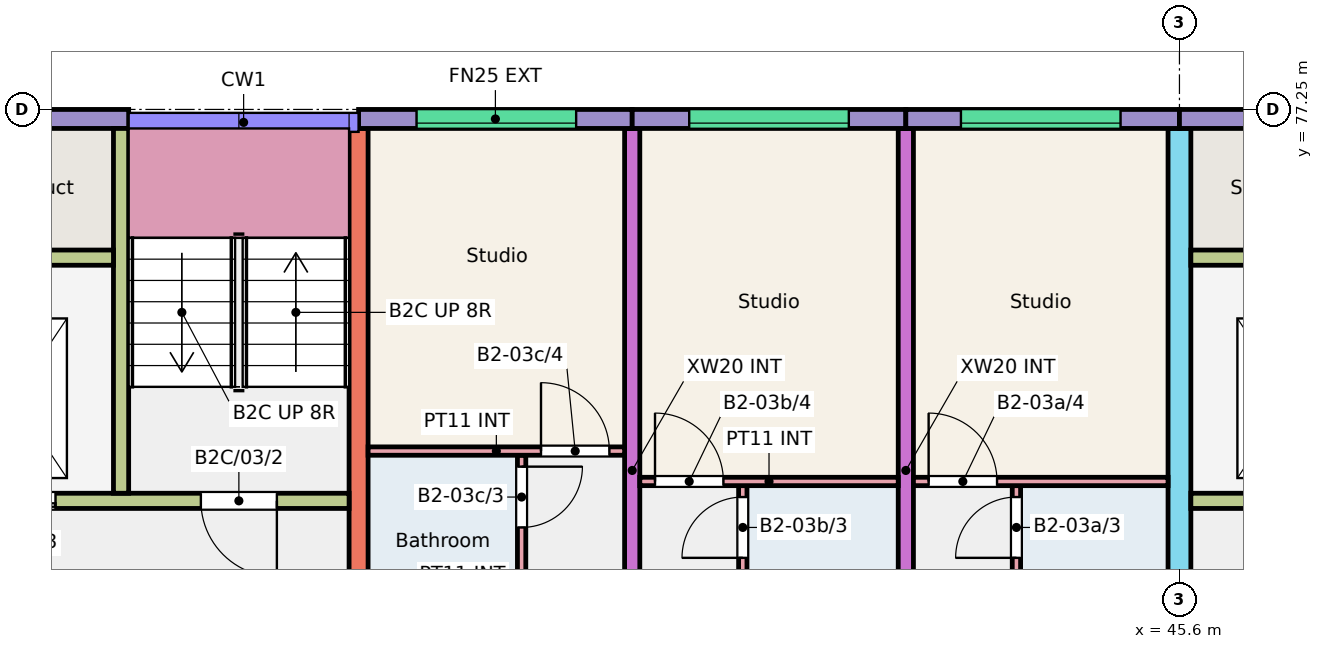
"""IFC4 building model, lengths in metres.
Left out: names, types, materials, properties, quantities, classifications, styles, units other than length and angle.
Written with IfcOpenShell. Run it as: python <this file> out.ifc"""

import sys

from ifc_helpers import new_model, si_unit, direction, frame, frame_2d, origin, place, context, subcontext, project, spatial, rectangle, extrude, element, fill, save


model = new_model("IFC4")
c1 = context("Model", 3, precision=1e-05, world=origin(), true_north=direction((0.0, 1.0)))
c2 = subcontext(c1, "Body", "Model", "MODEL_VIEW")
j1 = project(units=[si_unit("LENGTHUNIT", "METRE"), si_unit("PLANEANGLEUNIT", "RADIAN")], contexts=[c1])
p1 = place(None, origin())
s1 = spatial("IfcSite", under=j1, at=p1, CompositionType="ELEMENT")
p2 = place(p1, origin())
s2 = spatial("IfcBuilding", under=s1, at=p2, CompositionType="ELEMENT")
p3 = place(p2, frame((0.0, 0.0, 9.0)))
s3 = spatial("IfcBuildingStorey", under=s2, at=p3, CompositionType="ELEMENT", Elevation=9.0)
p4 = place(p3, frame((34.8, 68.0, 0.0), z_axis=(0.0, 0.0, 1.0), x_axis=(0.0, 1.0, 0.0)))
e1 = element("IfcWall", 1, at=p4, inside=s3, PredefinedType="SHEAR", context=c2, shape_type="SweptSolid", body=[
    extrude(rectangle(XDim=9.0, YDim=0.25, at=frame_2d((4.5, 0.0))), origin(), (0.0, 0.0, 1.0), 3.0),
])
for number, where, z_axis, x_axis in (
    (2, (38.4, 68.0, 0.0), (0.0, 0.0, 1.0), (0.0, 1.0, 0.0)),
    (3, (42.0, 68.0, 0.0), (0.0, 0.0, 1.0), (0.0, 1.0, 0.0)),
):
    element("IfcWall", number, at=place(p3, frame(where, z_axis=z_axis, x_axis=x_axis)), inside=s3, PredefinedType="SHEAR", context=c2, shape_type="SweptSolid", body=[
        extrude(rectangle(XDim=9.0, YDim=0.2, at=frame_2d((4.5, 0.0))), origin(), (0.0, 0.0, 1.0), 3.0),
    ])
p5 = place(p3, frame((45.6, 66.0, 0.0), z_axis=(0.0, 0.0, 1.0), x_axis=(0.0, 1.0, 0.0)))
e4 = element("IfcWall", 4, at=p5, inside=s3, PredefinedType="SHEAR", context=c2, shape_type="SweptSolid", body=[
    extrude(rectangle(XDim=11.0, YDim=0.3, at=frame_2d((5.5, 0.0))), origin(), (0.0, 0.0, 1.0), 3.0),
])
p6 = place(p5, frame((0.3, 0.0, 0.0)))
e5 = element("IfcOpeningElement", 5, at=p6, cuts=e4, PredefinedType="OPENING", context=c2, shape_type="SweptSolid", body=[
    extrude(rectangle(XDim=1.2, YDim=2.1, at=frame_2d((0.6, 1.05))), frame((0.0, 0.16, 0.0), z_axis=(0.0, -1.0, 0.0), x_axis=(1.0, 0.0, 0.0)), (0.0, 0.0, 1.0), 0.32),
])
p7 = place(p3, frame((28.8, 77.125, 0.0), z_axis=(0.0, 0.0, 1.0), x_axis=(1.0, 0.0, 0.0)))
e6 = element("IfcWall", 6, at=p7, inside=s3, PredefinedType="SOLIDWALL", context=c2, shape_type="SweptSolid", body=[
    extrude(rectangle(XDim=2.975, YDim=0.25, at=frame_2d((1.487, 0.0))), origin(), (0.0, 0.0, 1.0), 3.0),
])
p8 = place(p3, frame((28.95, 72.1, 0.0), z_axis=(0.0, 0.0, 1.0), x_axis=(1.0, 0.0, 0.0)))
e7 = element("IfcWall", 7, at=p8, inside=s3, PredefinedType="SHEAR", context=c2, shape_type="SweptSolid", body=[
    extrude(rectangle(XDim=5.725, YDim=0.2, at=frame_2d((2.863, 0.0))), origin(), (0.0, 0.0, 1.0), 3.0),
])
p9 = place(p8, frame((3.775, 0.0, 0.0)))
e8 = element("IfcOpeningElement", 8, at=p9, cuts=e7, PredefinedType="OPENING", context=c2, shape_type="SweptSolid", body=[
    extrude(rectangle(XDim=1.0, YDim=2.1, at=frame_2d((0.5, 1.05))), frame((0.0, 0.11, 0.0), z_axis=(0.0, -1.0, 0.0), x_axis=(1.0, 0.0, 0.0)), (0.0, 0.0, 1.0), 0.22),
])
p10 = place(p8, frame((0.762, 0.0, 0.0)))
e9 = element("IfcOpeningElement", 9, at=p10, cuts=e7, PredefinedType="OPENING", context=c2, shape_type="SweptSolid", body=[
    extrude(rectangle(XDim=1.1, YDim=2.1, at=frame_2d((0.55, 1.05))), frame((0.0, 0.11, 0.0), z_axis=(0.0, -1.0, 0.0), x_axis=(1.0, 0.0, 0.0)), (0.0, 0.0, 1.0), 0.22),
])
p11 = place(p3, frame((31.675, 72.2, 0.0), z_axis=(0.0, 0.0, 1.0), x_axis=(0.0, 1.0, 0.0)))
e10 = element("IfcWall", 10, at=p11, inside=s3, PredefinedType="SHEAR", context=c2, shape_type="SweptSolid", body=[
    extrude(rectangle(XDim=4.8, YDim=0.2, at=frame_2d((2.4, 0.0))), origin(), (0.0, 0.0, 1.0), 3.0),
])
p12 = place(p3, frame((28.95, 75.3, 0.0), z_axis=(0.0, 0.0, 1.0), x_axis=(1.0, 0.0, 0.0)))
e11 = element("IfcWall", 11, at=p12, inside=s3, PredefinedType="SHEAR", context=c2, shape_type="SweptSolid", body=[
    extrude(rectangle(XDim=2.625, YDim=0.2, at=frame_2d((1.312, 0.0))), origin(), (0.0, 0.0, 1.0), 3.0),
])
p13 = place(p3, frame((34.8, 77.125, 0.0), z_axis=(0.0, 0.0, 1.0), x_axis=(1.0, 0.0, 0.0)))
e12 = element("IfcWall", 12, at=p13, inside=s3, PredefinedType="SOLIDWALL", context=c2, shape_type="SweptSolid", body=[
    extrude(rectangle(XDim=3.6, YDim=0.25, at=frame_2d((1.8, 0.0))), origin(), (0.0, 0.0, 1.0), 3.0),
])
p14 = place(p13, frame((0.762, 0.0, 1.2)))
e13 = element("IfcOpeningElement", 13, at=p14, cuts=e12, PredefinedType="OPENING", context=c2, shape_type="SweptSolid", body=[
    extrude(rectangle(XDim=2.1, YDim=1.2, at=frame_2d((1.05, 0.6))), frame((0.0, 0.135, 0.0), z_axis=(0.0, -1.0, 0.0), x_axis=(1.0, 0.0, 0.0)), (0.0, 0.0, 1.0), 0.27),
])
p15 = place(p3, frame((38.4, 77.125, 0.0), z_axis=(0.0, 0.0, 1.0), x_axis=(1.0, 0.0, 0.0)))
e14 = element("IfcWall", 14, at=p15, inside=s3, PredefinedType="SOLIDWALL", context=c2, shape_type="SweptSolid", body=[
    extrude(rectangle(XDim=3.6, YDim=0.25, at=frame_2d((1.8, 0.0))), origin(), (0.0, 0.0, 1.0), 3.0),
])
p16 = place(p15, frame((0.75, 0.0, 1.2)))
e15 = element("IfcOpeningElement", 15, at=p16, cuts=e14, PredefinedType="OPENING", context=c2, shape_type="SweptSolid", body=[
    extrude(rectangle(XDim=2.1, YDim=1.2, at=frame_2d((1.05, 0.6))), frame((0.0, 0.135, 0.0), z_axis=(0.0, -1.0, 0.0), x_axis=(1.0, 0.0, 0.0)), (0.0, 0.0, 1.0), 0.27),
])
p17 = place(p3, frame((42.0, 77.125, 0.0), z_axis=(0.0, 0.0, 1.0), x_axis=(1.0, 0.0, 0.0)))
e16 = element("IfcWall", 16, at=p17, inside=s3, PredefinedType="SOLIDWALL", context=c2, shape_type="SweptSolid", body=[
    extrude(rectangle(XDim=3.6, YDim=0.25, at=frame_2d((1.8, 0.0))), origin(), (0.0, 0.0, 1.0), 3.0),
])
p18 = place(p17, frame((0.725, 0.0, 1.2)))
e17 = element("IfcOpeningElement", 17, at=p18, cuts=e16, PredefinedType="OPENING", context=c2, shape_type="SweptSolid", body=[
    extrude(rectangle(XDim=2.1, YDim=1.2, at=frame_2d((1.05, 0.6))), frame((0.0, 0.135, 0.0), z_axis=(0.0, -1.0, 0.0), x_axis=(1.0, 0.0, 0.0)), (0.0, 0.0, 1.0), 0.27),
])
p19 = place(p3, frame((45.6, 77.125, 0.0), z_axis=(0.0, 0.0, 1.0), x_axis=(1.0, 0.0, 0.0)))
e18 = element("IfcWall", 18, at=p19, inside=s3, PredefinedType="SOLIDWALL", context=c2, shape_type="SweptSolid", body=[
    extrude(rectangle(XDim=2.975, YDim=0.25, at=frame_2d((1.487, 0.0))), origin(), (0.0, 0.0, 1.0), 3.0),
])
p20 = place(p3, frame((45.75, 72.1, 0.0), z_axis=(0.0, 0.0, 1.0), x_axis=(1.0, 0.0, 0.0)))
e19 = element("IfcWall", 19, at=p20, inside=s3, PredefinedType="SHEAR", context=c2, shape_type="SweptSolid", body=[
    extrude(rectangle(XDim=5.725, YDim=0.2, at=frame_2d((2.863, 0.0))), origin(), (0.0, 0.0, 1.0), 3.0),
])
p21 = place(p20, frame((3.775, 0.0, 0.0)))
e20 = element("IfcOpeningElement", 20, at=p21, cuts=e19, PredefinedType="OPENING", context=c2, shape_type="SweptSolid", body=[
    extrude(rectangle(XDim=1.0, YDim=2.1, at=frame_2d((0.5, 1.05))), frame((0.0, 0.11, 0.0), z_axis=(0.0, -1.0, 0.0), x_axis=(1.0, 0.0, 0.0)), (0.0, 0.0, 1.0), 0.22),
])
p22 = place(p20, frame((0.762, 0.0, 0.0)))
e21 = element("IfcOpeningElement", 21, at=p22, cuts=e19, PredefinedType="OPENING", context=c2, shape_type="SweptSolid", body=[
    extrude(rectangle(XDim=1.1, YDim=2.1, at=frame_2d((0.55, 1.05))), frame((0.0, 0.11, 0.0), z_axis=(0.0, -1.0, 0.0), x_axis=(1.0, 0.0, 0.0)), (0.0, 0.0, 1.0), 0.22),
])
p23 = place(p3, frame((45.75, 75.3, 0.0), z_axis=(0.0, 0.0, 1.0), x_axis=(1.0, 0.0, 0.0)))
e22 = element("IfcWall", 22, at=p23, inside=s3, PredefinedType="SHEAR", context=c2, shape_type="SweptSolid", body=[
    extrude(rectangle(XDim=2.625, YDim=0.2, at=frame_2d((1.312, 0.0))), origin(), (0.0, 0.0, 1.0), 3.0),
])
p24 = place(p3, frame((43.455, 68.0, 0.0), z_axis=(0.0, 0.0, 1.0), x_axis=(0.0, 1.0, 0.0)))
e23 = element("IfcWall", 23, at=p24, inside=s3, PredefinedType="PARTITIONING", context=c2, shape_type="SweptSolid", body=[
    extrude(rectangle(XDim=4.3, YDim=0.11, at=frame_2d((2.15, 0.0))), origin(), (0.0, 0.0, 1.0), 2.8),
])
p25 = place(p24, frame((0.2, 0.0, 0.0)))
e24 = element("IfcOpeningElement", 24, at=p25, cuts=e23, PredefinedType="OPENING", context=c2, shape_type="SweptSolid", body=[
    extrude(rectangle(XDim=0.8, YDim=2.1, at=frame_2d((0.4, 1.05))), frame((0.0, 0.065, 0.0), z_axis=(0.0, -1.0, 0.0), x_axis=(1.0, 0.0, 0.0)), (0.0, 0.0, 1.0), 0.13),
])
p26 = place(p24, frame((3.35, 0.0, 0.0)))
e25 = element("IfcOpeningElement", 25, at=p26, cuts=e23, PredefinedType="OPENING", context=c2, shape_type="SweptSolid", body=[
    extrude(rectangle(XDim=0.8, YDim=2.1, at=frame_2d((0.4, 1.05))), frame((0.0, 0.065, 0.0), z_axis=(0.0, -1.0, 0.0), x_axis=(1.0, 0.0, 0.0)), (0.0, 0.0, 1.0), 0.13),
])
p27 = place(p3, frame((42.1, 72.355, 0.0), z_axis=(0.0, 0.0, 1.0), x_axis=(1.0, 0.0, 0.0)))
e26 = element("IfcWall", 26, at=p27, inside=s3, PredefinedType="PARTITIONING", context=c2, shape_type="SweptSolid", body=[
    extrude(rectangle(XDim=3.35, YDim=0.11, at=frame_2d((1.675, 0.0))), origin(), (0.0, 0.0, 1.0), 2.8),
])
p28 = place(p27, frame((0.2, 0.0, 0.0)))
e27 = element("IfcOpeningElement", 27, at=p28, cuts=e26, PredefinedType="OPENING", context=c2, shape_type="SweptSolid", body=[
    extrude(rectangle(XDim=0.9, YDim=2.1, at=frame_2d((0.45, 1.05))), frame((0.0, 0.065, 0.0), z_axis=(0.0, -1.0, 0.0), x_axis=(1.0, 0.0, 0.0)), (0.0, 0.0, 1.0), 0.13),
])
p29 = place(p3, frame((39.855, 68.0, 0.0), z_axis=(0.0, 0.0, 1.0), x_axis=(0.0, 1.0, 0.0)))
e28 = element("IfcWall", 28, at=p29, inside=s3, PredefinedType="PARTITIONING", context=c2, shape_type="SweptSolid", body=[
    extrude(rectangle(XDim=4.3, YDim=0.11, at=frame_2d((2.15, 0.0))), origin(), (0.0, 0.0, 1.0), 2.8),
])
p30 = place(p29, frame((0.2, 0.0, 0.0)))
e29 = element("IfcOpeningElement", 29, at=p30, cuts=e28, PredefinedType="OPENING", context=c2, shape_type="SweptSolid", body=[
    extrude(rectangle(XDim=0.8, YDim=2.1, at=frame_2d((0.4, 1.05))), frame((0.0, 0.065, 0.0), z_axis=(0.0, -1.0, 0.0), x_axis=(1.0, 0.0, 0.0)), (0.0, 0.0, 1.0), 0.13),
])
p31 = place(p29, frame((3.35, 0.0, 0.0)))
e30 = element("IfcOpeningElement", 30, at=p31, cuts=e28, PredefinedType="OPENING", context=c2, shape_type="SweptSolid", body=[
    extrude(rectangle(XDim=0.8, YDim=2.1, at=frame_2d((0.4, 1.05))), frame((0.0, 0.065, 0.0), z_axis=(0.0, -1.0, 0.0), x_axis=(1.0, 0.0, 0.0)), (0.0, 0.0, 1.0), 0.13),
])
p32 = place(p3, frame((38.5, 72.355, 0.0), z_axis=(0.0, 0.0, 1.0), x_axis=(1.0, 0.0, 0.0)))
e31 = element("IfcWall", 31, at=p32, inside=s3, PredefinedType="PARTITIONING", context=c2, shape_type="SweptSolid", body=[
    extrude(rectangle(XDim=3.4, YDim=0.11, at=frame_2d((1.7, 0.0))), origin(), (0.0, 0.0, 1.0), 2.8),
])
p33 = place(p32, frame((0.2, 0.0, 0.0)))
e32 = element("IfcOpeningElement", 32, at=p33, cuts=e31, PredefinedType="OPENING", context=c2, shape_type="SweptSolid", body=[
    extrude(rectangle(XDim=0.9, YDim=2.1, at=frame_2d((0.45, 1.05))), frame((0.0, 0.065, 0.0), z_axis=(0.0, -1.0, 0.0), x_axis=(1.0, 0.0, 0.0)), (0.0, 0.0, 1.0), 0.13),
])
p34 = place(p3, frame((36.945, 68.0, 0.0), z_axis=(0.0, 0.0, 1.0), x_axis=(0.0, 1.0, 0.0)))
e33 = element("IfcWall", 33, at=p34, inside=s3, PredefinedType="PARTITIONING", context=c2, shape_type="SweptSolid", body=[
    extrude(rectangle(XDim=4.7, YDim=0.11, at=frame_2d((2.35, 0.0))), origin(), (0.0, 0.0, 1.0), 2.8),
])
p35 = place(p34, frame((0.2, 0.0, 0.0)))
e34 = element("IfcOpeningElement", 34, at=p35, cuts=e33, PredefinedType="OPENING", context=c2, shape_type="SweptSolid", body=[
    extrude(rectangle(XDim=0.8, YDim=2.1, at=frame_2d((0.4, 1.05))), frame((0.0, 0.065, 0.0), z_axis=(0.0, -1.0, 0.0), x_axis=(1.0, 0.0, 0.0)), (0.0, 0.0, 1.0), 0.13),
])
p36 = place(p34, frame((3.75, 0.0, 0.0)))
e35 = element("IfcOpeningElement", 35, at=p36, cuts=e33, PredefinedType="OPENING", context=c2, shape_type="SweptSolid", body=[
    extrude(rectangle(XDim=0.8, YDim=2.1, at=frame_2d((0.4, 1.05))), frame((0.0, 0.065, 0.0), z_axis=(0.0, -1.0, 0.0), x_axis=(1.0, 0.0, 0.0)), (0.0, 0.0, 1.0), 0.13),
])
p37 = place(p3, frame((34.925, 72.755, 0.0), z_axis=(0.0, 0.0, 1.0), x_axis=(1.0, 0.0, 0.0)))
e36 = element("IfcWall", 36, at=p37, inside=s3, PredefinedType="PARTITIONING", context=c2, shape_type="SweptSolid", body=[
    extrude(rectangle(XDim=3.375, YDim=0.11, at=frame_2d((1.688, 0.0))), origin(), (0.0, 0.0, 1.0), 2.8),
])
p38 = place(p37, frame((2.275, 0.0, 0.0)))
e37 = element("IfcOpeningElement", 37, at=p38, cuts=e36, PredefinedType="OPENING", context=c2, shape_type="SweptSolid", body=[
    extrude(rectangle(XDim=0.9, YDim=2.1, at=frame_2d((0.45, 1.05))), frame((0.0, 0.065, 0.0), z_axis=(0.0, -1.0, 0.0), x_axis=(1.0, 0.0, 0.0)), (0.0, 0.0, 1.0), 0.13),
])
p39 = place(p18, origin())
e38 = element("IfcWindow", 38, at=p39, inside=s3, PartitioningType="SINGLE_PANEL", PredefinedType="WINDOW", context=c2, shape_type="SweptSolid", body=[
    extrude(rectangle(XDim=2.1, YDim=1.2, at=frame_2d((1.05, 0.6))), frame((0.0, -0.025, 0.0), z_axis=(0.0, -1.0, 0.0), x_axis=(1.0, 0.0, 0.0)), (0.0, 0.0, 1.0), 0.06),
])
fill(e17, e38)
p40 = place(p16, origin())
e39 = element("IfcWindow", 39, at=p40, inside=s3, PartitioningType="SINGLE_PANEL", PredefinedType="WINDOW", context=c2, shape_type="SweptSolid", body=[
    extrude(rectangle(XDim=2.1, YDim=1.2, at=frame_2d((1.05, 0.6))), frame((0.0, -0.025, 0.0), z_axis=(0.0, -1.0, 0.0), x_axis=(1.0, 0.0, 0.0)), (0.0, 0.0, 1.0), 0.06),
])
fill(e15, e39)
p41 = place(p14, origin())
e40 = element("IfcWindow", 40, at=p41, inside=s3, PartitioningType="SINGLE_PANEL", PredefinedType="WINDOW", context=c2, shape_type="SweptSolid", body=[
    extrude(rectangle(XDim=2.1, YDim=1.2, at=frame_2d((1.05, 0.6))), frame((0.0, -0.025, 0.0), z_axis=(0.0, -1.0, 0.0), x_axis=(1.0, 0.0, 0.0)), (0.0, 0.0, 1.0), 0.06),
])
fill(e13, e40)
p42 = place(p26, origin())
e41 = element("IfcDoor", 41, at=p42, inside=s3, OperationType="SINGLE_SWING_LEFT", PredefinedType="DOOR", context=c2, shape_type="SweptSolid", body=[
    extrude(rectangle(XDim=0.8, YDim=2.1, at=frame_2d((0.4, 1.05))), frame((0.0, 0.025, 0.0), z_axis=(0.0, -1.0, 0.0), x_axis=(1.0, 0.0, 0.0)), (0.0, 0.0, 1.0), 0.05),
])
fill(e25, e41)
p43 = place(p28, origin())
e42 = element("IfcDoor", 42, at=p43, inside=s3, OperationType="SINGLE_SWING_LEFT", PredefinedType="DOOR", context=c2, shape_type="SweptSolid", body=[
    extrude(rectangle(XDim=0.9, YDim=2.1, at=frame_2d((0.45, 1.05))), frame((0.0, 0.025, 0.0), z_axis=(0.0, -1.0, 0.0), x_axis=(1.0, 0.0, 0.0)), (0.0, 0.0, 1.0), 0.05),
])
fill(e27, e42)
p44 = place(p31, origin())
e43 = element("IfcDoor", 43, at=p44, inside=s3, OperationType="SINGLE_SWING_LEFT", PredefinedType="DOOR", context=c2, shape_type="SweptSolid", body=[
    extrude(rectangle(XDim=0.8, YDim=2.1, at=frame_2d((0.4, 1.05))), frame((0.0, 0.025, 0.0), z_axis=(0.0, -1.0, 0.0), x_axis=(1.0, 0.0, 0.0)), (0.0, 0.0, 1.0), 0.05),
])
fill(e30, e43)
p45 = place(p33, origin())
e44 = element("IfcDoor", 44, at=p45, inside=s3, OperationType="SINGLE_SWING_LEFT", PredefinedType="DOOR", context=c2, shape_type="SweptSolid", body=[
    extrude(rectangle(XDim=0.9, YDim=2.1, at=frame_2d((0.45, 1.05))), frame((0.0, 0.025, 0.0), z_axis=(0.0, -1.0, 0.0), x_axis=(1.0, 0.0, 0.0)), (0.0, 0.0, 1.0), 0.05),
])
fill(e32, e44)
p46 = place(p36, origin())
e45 = element("IfcDoor", 45, at=p46, inside=s3, OperationType="SINGLE_SWING_RIGHT", PredefinedType="DOOR", context=c2, shape_type="SweptSolid", body=[
    extrude(rectangle(XDim=0.8, YDim=2.1, at=frame_2d((0.4, 1.05))), frame((0.0, 0.025, 0.0), z_axis=(0.0, -1.0, 0.0), x_axis=(1.0, 0.0, 0.0)), (0.0, 0.0, 1.0), 0.05),
])
fill(e35, e45)
p47 = place(p38, origin())
e46 = element("IfcDoor", 46, at=p47, inside=s3, OperationType="SINGLE_SWING_LEFT", PredefinedType="DOOR", context=c2, shape_type="SweptSolid", body=[
    extrude(rectangle(XDim=0.9, YDim=2.1, at=frame_2d((0.45, 1.05))), frame((0.0, 0.025, 0.0), z_axis=(0.0, -1.0, 0.0), x_axis=(1.0, 0.0, 0.0)), (0.0, 0.0, 1.0), 0.05),
])
fill(e37, e46)
p48 = place(p9, origin())
e47 = element("IfcDoor", 47, at=p48, inside=s3, OperationType="SINGLE_SWING_RIGHT", PredefinedType="DOOR", context=c2, shape_type="SweptSolid", body=[
    extrude(rectangle(XDim=1.0, YDim=2.1, at=frame_2d((0.5, 1.05))), frame((0.0, 0.025, 0.0), z_axis=(0.0, -1.0, 0.0), x_axis=(1.0, 0.0, 0.0)), (0.0, 0.0, 1.0), 0.05),
])
fill(e8, e47)
p49 = place(p10, origin())
e48 = element("IfcDoor", 48, at=p49, inside=s3, OperationType="DOUBLE_DOOR_SLIDING", PredefinedType="DOOR", context=c2, shape_type="SweptSolid", body=[
    extrude(rectangle(XDim=1.1, YDim=2.1, at=frame_2d((0.55, 1.05))), frame((0.0, 0.025, 0.0), z_axis=(0.0, -1.0, 0.0), x_axis=(1.0, 0.0, 0.0)), (0.0, 0.0, 1.0), 0.05),
])
fill(e9, e48)
save(model, sys.argv[1])
